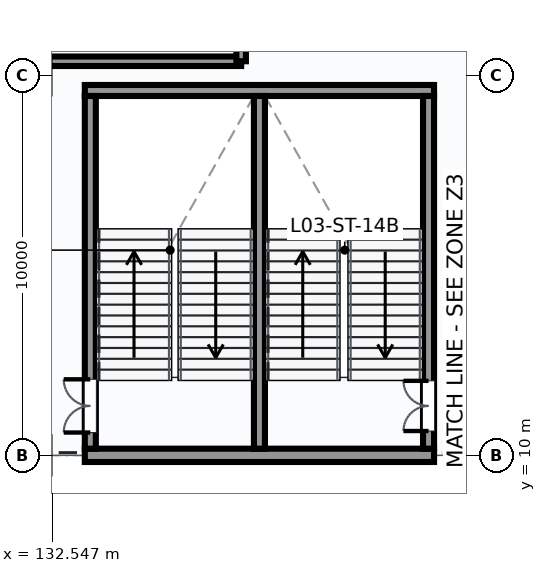
"""IFC4 building model, lengths in metres.
Left out: names, types, materials, properties, quantities, classifications, styles, units other than length and angle.
Written with IfcOpenShell. Run it as: python <this file> out.ifc"""

import sys

from ifc_helpers import new_model, si_unit, direction, frame, frame_2d, origin, place, context, subcontext, project, spatial, rectangle, extrude, element, fill, save


model = new_model("IFC4")
c1 = context("Model", 3, precision=1e-05, world=origin(), true_north=direction((0.0, 1.0)))
c2 = subcontext(c1, "Body", "Model", "MODEL_VIEW")
j1 = project(units=[si_unit("LENGTHUNIT", "METRE"), si_unit("PLANEANGLEUNIT", "RADIAN")], contexts=[c1])
p1 = place(None, origin())
s1 = spatial("IfcSite", under=j1, at=p1, CompositionType="ELEMENT")
p2 = place(p1, origin())
s2 = spatial("IfcBuilding", under=s1, at=p2, CompositionType="ELEMENT")
p3 = place(p2, frame((0.0, 0.0, 14.7)))
s3 = spatial("IfcBuildingStorey", under=s2, at=p3, CompositionType="ELEMENT", Elevation=14.7)
p4 = place(p3, frame((133.405, 10.0, 0.0), z_axis=(0.0, 0.0, 1.0), x_axis=(1.0, 0.0, 0.0)))
e1 = element("IfcWall", 1, at=p4, inside=s3, PredefinedType="SHEAR", context=c2, shape_type="SweptSolid", body=[
    extrude(rectangle(XDim=9.19, YDim=0.35, at=frame_2d((4.595, 0.0))), origin(), (0.0, 0.0, 1.0), 3.447),
])
p5 = place(p3, frame((133.405, 19.6, 0.0), z_axis=(0.0, 0.0, 1.0), x_axis=(1.0, 0.0, 0.0)))
e2 = element("IfcWall", 2, at=p5, inside=s3, PredefinedType="SHEAR", context=c2, shape_type="SweptSolid", body=[
    extrude(rectangle(XDim=9.19, YDim=0.29, at=frame_2d((4.595, 0.0))), origin(), (0.0, 0.0, 1.0), 4.5),
])
p6 = place(p3, frame((133.55, 10.175, 0.0), z_axis=(0.0, 0.0, 1.0), x_axis=(0.0, 1.0, 0.0)))
e3 = element("IfcWall", 3, at=p6, inside=s3, PredefinedType="SHEAR", context=c2, shape_type="SweptSolid", body=[
    extrude(rectangle(XDim=9.28, YDim=0.29, at=frame_2d((4.64, 0.0))), origin(), (0.0, 0.0, 1.0), 4.5),
])
p7 = place(p6, frame((0.425, 0.0, 0.0)))
e4 = element("IfcOpeningElement", 4, at=p7, cuts=e3, PredefinedType="OPENING", context=c2, shape_type="SweptSolid", body=[
    extrude(rectangle(XDim=1.4, YDim=2.2, at=frame_2d((0.7, 1.1))), frame((0.0, 0.155, 0.0), z_axis=(0.0, -1.0, 0.0), x_axis=(1.0, 0.0, 0.0)), (0.0, 0.0, 1.0), 0.31),
])
p8 = place(p3, frame((142.45, 10.175, 0.0), z_axis=(0.0, 0.0, 1.0), x_axis=(0.0, 1.0, 0.0)))
e5 = element("IfcWall", 5, at=p8, inside=s3, PredefinedType="SHEAR", context=c2, shape_type="SweptSolid", body=[
    extrude(rectangle(XDim=9.28, YDim=0.29, at=frame_2d((4.64, 0.0))), origin(), (0.0, 0.0, 1.0), 4.5),
])
p9 = place(p8, frame((0.465, 0.0, 0.0)))
e6 = element("IfcOpeningElement", 6, at=p9, cuts=e5, PredefinedType="OPENING", context=c2, shape_type="SweptSolid", body=[
    extrude(rectangle(XDim=1.32, YDim=2.2, at=frame_2d((0.66, 1.1))), frame((0.0, 0.155, 0.0), z_axis=(0.0, -1.0, 0.0), x_axis=(1.0, 0.0, 0.0)), (0.0, 0.0, 1.0), 0.31),
])
p10 = place(p3, frame((138.0, 10.175, 0.0), z_axis=(0.0, 0.0, 1.0), x_axis=(0.0, 1.0, 0.0)))
e7 = element("IfcWall", 7, at=p10, inside=s3, PredefinedType="SHEAR", context=c2, shape_type="SweptSolid", body=[
    extrude(rectangle(XDim=9.28, YDim=0.29, at=frame_2d((4.64, 0.0))), origin(), (0.0, 0.0, 1.0), 4.5),
])
p11 = place(p3, frame((137.519, 20.369, 0.0), z_axis=(0.0, 0.0, 1.0), x_axis=(-1.0, 0.0, 0.0)))
e8 = element("IfcWall", 8, at=p11, inside=s3, PredefinedType="SOLIDWALL", context=c2, shape_type="SweptSolid", body=[
    extrude(rectangle(XDim=10.4, YDim=0.25, at=frame_2d((5.2, 0.0))), origin(), (0.0, 0.0, 1.0), 2.603),
])
p12 = place(p3, frame((137.519, 28.769, 0.0), z_axis=(0.0, 0.0, 1.0), x_axis=(0.0, -1.0, 0.0)))
e9 = element("IfcWall", 9, at=p12, inside=s3, PredefinedType="SOLIDWALL", context=c2, shape_type="SweptSolid", body=[
    extrude(rectangle(XDim=8.4, YDim=0.25, at=frame_2d((4.2, 0.0))), origin(), (0.0, 0.0, 1.0), 2.603),
])
p13 = place(p12, frame((5.548, 0.0, 0.0)))
e10 = element("IfcOpeningElement", 10, at=p13, cuts=e9, PredefinedType="OPENING", context=c2, shape_type="SweptSolid", body=[
    extrude(rectangle(XDim=1.0, YDim=2.2, at=frame_2d((0.5, 1.1))), frame((0.0, 0.135, 0.0), z_axis=(0.0, -1.0, 0.0), x_axis=(1.0, 0.0, 0.0)), (0.0, 0.0, 1.0), 0.27),
])
p14 = place(p7, frame((1.4, 0.0, 0.0), z_axis=(0.0, 0.0, 1.0), x_axis=(-1.0, 0.0, 0.0)))
e11 = element("IfcDoor", 11, at=p14, inside=s3, OperationType="DOUBLE_DOOR_SINGLE_SWING", PredefinedType="DOOR", context=c2, shape_type="SweptSolid", body=[
    extrude(rectangle(XDim=1.4, YDim=2.2, at=frame_2d((0.7, 1.1))), frame((0.0, 0.025, 0.0), z_axis=(0.0, -1.0, 0.0), x_axis=(1.0, 0.0, 0.0)), (0.0, 0.0, 1.0), 0.05),
])
fill(e4, e11)
p15 = place(p9, origin())
e12 = element("IfcDoor", 12, at=p15, inside=s3, OperationType="DOUBLE_DOOR_SINGLE_SWING", PredefinedType="DOOR", context=c2, shape_type="SweptSolid", body=[
    extrude(rectangle(XDim=1.32, YDim=2.2, at=frame_2d((0.66, 1.1))), frame((0.0, 0.025, 0.0), z_axis=(0.0, -1.0, 0.0), x_axis=(1.0, 0.0, 0.0)), (0.0, 0.0, 1.0), 0.05),
])
fill(e6, e12)
save(model, sys.argv[1])
